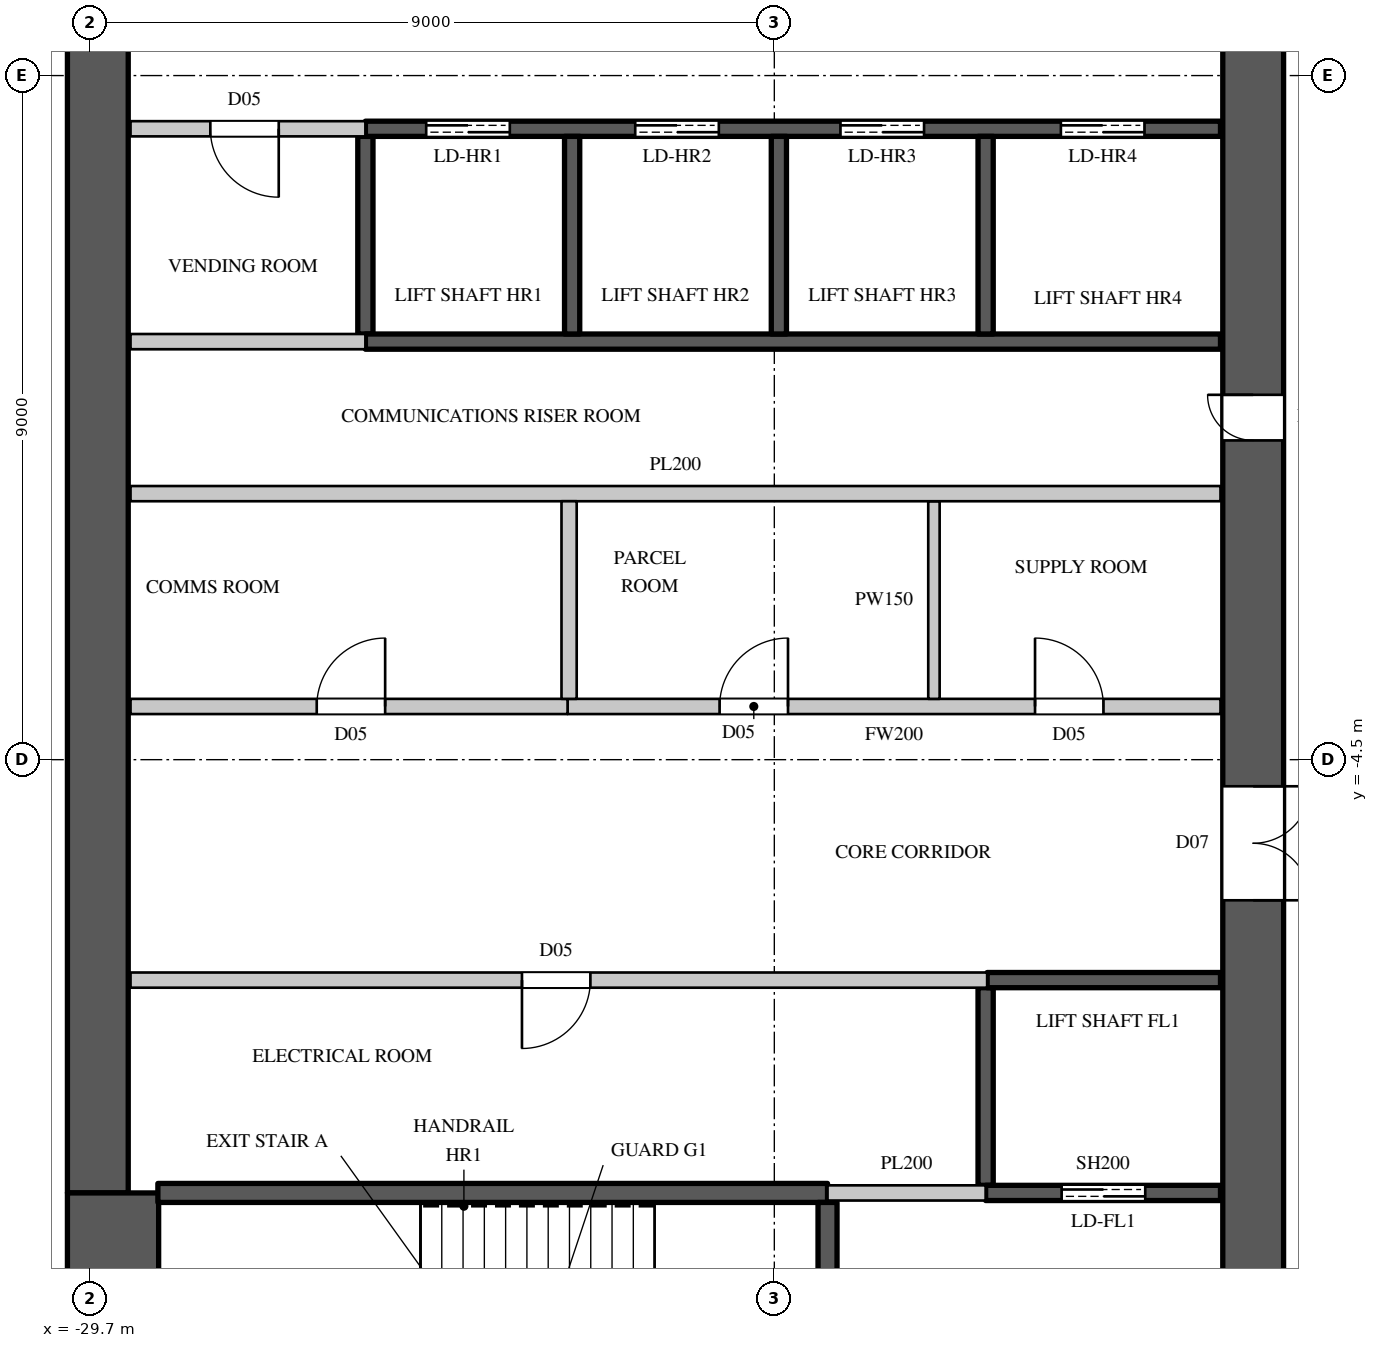
"""IFC4 building model, lengths in metres.
Left out: names, types, materials, properties, quantities, classifications, styles, units other than length and angle.
Written with IfcOpenShell. Run it as: python <this file> out.ifc"""

import sys

from ifc_helpers import new_model, si_unit, direction, frame, frame_2d, origin, place, context, subcontext, project, spatial, rectangle, extrude, element, fill, save


model = new_model("IFC4")
c1 = context("Model", 3, precision=1e-05, world=origin(), true_north=direction((0.0, 1.0)))
c2 = subcontext(c1, "Body", "Model", "MODEL_VIEW")
j1 = project(units=[si_unit("LENGTHUNIT", "METRE"), si_unit("PLANEANGLEUNIT", "RADIAN")], contexts=[c1])
p1 = place(None, origin())
s1 = spatial("IfcSite", under=j1, at=p1, CompositionType="ELEMENT")
p2 = place(p1, origin())
s2 = spatial("IfcBuilding", under=s1, at=p2, CompositionType="ELEMENT")
p3 = place(p2, frame((0.0, 0.0, 197.4)))
s3 = spatial("IfcBuildingStorey", under=s2, at=p3, CompositionType="ELEMENT", Elevation=197.4)
p4 = place(p3, frame((-14.4, -14.8, 0.0), z_axis=(0.0, 0.0, 1.0), x_axis=(0.0, 1.0, 0.0)))
e1 = element("IfcWall", 1, at=p4, inside=s3, PredefinedType="SHEAR", context=c2, shape_type="SweptSolid", body=[
    extrude(rectangle(XDim=29.6, YDim=0.8, at=frame_2d((14.8, 0.0))), origin(), (0.0, 0.0, 1.0), 4.1),
])
p5 = place(p4, frame((1.55, 0.0, 0.0)))
e2 = element("IfcOpeningElement", 2, at=p5, cuts=e1, PredefinedType="OPENING", context=c2, shape_type="SweptSolid", body=[
    extrude(rectangle(XDim=1.5, YDim=2.4, at=frame_2d((0.75, 1.2))), frame((0.0, 0.41, 0.0), z_axis=(0.0, -1.0, 0.0), x_axis=(1.0, 0.0, 0.0)), (0.0, 0.0, 1.0), 0.82),
])
p6 = place(p4, frame((26.55, 0.0, 0.0)))
e3 = element("IfcOpeningElement", 3, at=p6, cuts=e1, PredefinedType="OPENING", context=c2, shape_type="SweptSolid", body=[
    extrude(rectangle(XDim=1.5, YDim=2.4, at=frame_2d((0.75, 1.2))), frame((0.0, 0.41, 0.0), z_axis=(0.0, -1.0, 0.0), x_axis=(1.0, 0.0, 0.0)), (0.0, 0.0, 1.0), 0.82),
])
p7 = place(p4, frame((8.45, 0.0, 0.0)))
e4 = element("IfcOpeningElement", 4, at=p7, cuts=e1, PredefinedType="OPENING", context=c2, shape_type="SweptSolid", body=[
    extrude(rectangle(XDim=1.5, YDim=2.4, at=frame_2d((0.75, 1.2))), frame((0.0, 0.41, 0.0), z_axis=(0.0, -1.0, 0.0), x_axis=(1.0, 0.0, 0.0)), (0.0, 0.0, 1.0), 0.82),
])
p8 = place(p4, frame((19.65, 0.0, 0.0)))
e5 = element("IfcOpeningElement", 5, at=p8, cuts=e1, PredefinedType="OPENING", context=c2, shape_type="SweptSolid", body=[
    extrude(rectangle(XDim=1.5, YDim=2.4, at=frame_2d((0.75, 1.2))), frame((0.0, 0.41, 0.0), z_axis=(0.0, -1.0, 0.0), x_axis=(1.0, 0.0, 0.0)), (0.0, 0.0, 1.0), 0.82),
])
p9 = place(p4, frame((14.5, 0.0, 0.0)))
e6 = element("IfcOpeningElement", 6, at=p9, cuts=e1, PredefinedType="OPENING", context=c2, shape_type="SweptSolid", body=[
    extrude(rectangle(XDim=0.6, YDim=2.0, at=frame_2d((0.3, 1.0))), frame((0.0, 0.41, 0.0), z_axis=(0.0, -1.0, 0.0), x_axis=(1.0, 0.0, 0.0)), (0.0, 0.0, 1.0), 0.82),
])
p10 = place(p3, frame((-29.6, -10.2, 0.0), z_axis=(0.0, 0.0, 1.0), x_axis=(0.0, 1.0, 0.0)))
e7 = element("IfcWall", 7, at=p10, inside=s3, PredefinedType="SHEAR", context=c2, shape_type="SweptSolid", body=[
    extrude(rectangle(XDim=20.4, YDim=0.8, at=frame_2d((10.2, 0.0))), origin(), (0.0, 0.0, 1.0), 4.1),
])
p11 = place(p3, frame((-29.4, -14.8, 0.0), z_axis=(0.0, 0.0, 1.0), x_axis=(0.0, 1.0, 0.0)))
e8 = element("IfcWall", 8, at=p11, inside=s3, PredefinedType="SHEAR", context=c2, shape_type="SweptSolid", body=[
    extrude(rectangle(XDim=4.6, YDim=1.2, at=frame_2d((2.3, 0.0))), origin(), (0.0, 0.0, 1.0), 4.1),
])
p12 = place(p3, frame((-29.17, 3.8, 0.0), z_axis=(0.0, 0.0, 1.0), x_axis=(1.0, 0.0, 0.0)))
e9 = element("IfcWall", 9, at=p12, inside=s3, PredefinedType="PARTITIONING", context=c2, shape_type="SweptSolid", body=[
    extrude(rectangle(XDim=3.09, YDim=0.2, at=frame_2d((1.545, 0.0))), origin(), (0.0, 0.0, 1.0), 3.8),
])
p13 = place(p12, frame((1.05, 0.0, 0.0)))
e10 = element("IfcOpeningElement", 10, at=p13, cuts=e9, PredefinedType="OPENING", context=c2, shape_type="SweptSolid", body=[
    extrude(rectangle(XDim=0.9, YDim=2.2, at=frame_2d((0.45, 1.1))), frame((0.0, 0.11, 0.0), z_axis=(0.0, -1.0, 0.0), x_axis=(1.0, 0.0, 0.0)), (0.0, 0.0, 1.0), 0.22),
])
p14 = place(p3, frame((-23.42, -3.8, 0.0), z_axis=(0.0, 0.0, 1.0), x_axis=(1.0, 0.0, 0.0)))
e11 = element("IfcWall", 11, at=p14, inside=s3, PredefinedType="PARTITIONING", context=c2, shape_type="SweptSolid", body=[
    extrude(rectangle(XDim=8.59, YDim=0.2, at=frame_2d((4.295, 0.0))), origin(), (0.0, 0.0, 1.0), 3.8),
])
p15 = place(p14, frame((2.0, 0.0, 0.0)))
e12 = element("IfcOpeningElement", 12, at=p15, cuts=e11, PredefinedType="OPENING", context=c2, shape_type="SweptSolid", body=[
    extrude(rectangle(XDim=0.9, YDim=2.2, at=frame_2d((0.45, 1.1))), frame((0.0, 0.11, 0.0), z_axis=(0.0, -1.0, 0.0), x_axis=(1.0, 0.0, 0.0)), (0.0, 0.0, 1.0), 0.22),
])
p16 = place(p14, frame((6.15, 0.0, 0.0)))
e13 = element("IfcOpeningElement", 13, at=p16, cuts=e11, PredefinedType="OPENING", context=c2, shape_type="SweptSolid", body=[
    extrude(rectangle(XDim=0.9, YDim=2.2, at=frame_2d((0.45, 1.1))), frame((0.0, 0.11, 0.0), z_axis=(0.0, -1.0, 0.0), x_axis=(1.0, 0.0, 0.0)), (0.0, 0.0, 1.0), 0.22),
])
p17 = place(p3, frame((-18.6, -3.7, 0.0), z_axis=(0.0, 0.0, 1.0), x_axis=(0.0, 1.0, 0.0)))
e14 = element("IfcWall", 14, at=p17, inside=s3, PredefinedType="PARTITIONING", context=c2, shape_type="SweptSolid", body=[
    extrude(rectangle(XDim=2.6, YDim=0.15, at=frame_2d((1.3, 0.0))), origin(), (0.0, 0.0, 1.0), 3.8),
])
p18 = place(p3, frame((-29.17, -7.4, 0.0), z_axis=(0.0, 0.0, 1.0), x_axis=(1.0, 0.0, 0.0)))
e15 = element("IfcWall", 15, at=p18, inside=s3, PredefinedType="PARTITIONING", context=c2, shape_type="SweptSolid", body=[
    extrude(rectangle(XDim=11.27, YDim=0.2, at=frame_2d((5.635, 0.0))), origin(), (0.0, 0.0, 1.0), 3.8),
])
p19 = place(p18, frame((5.15, 0.0, 0.0)))
e16 = element("IfcOpeningElement", 16, at=p19, cuts=e15, PredefinedType="OPENING", context=c2, shape_type="SweptSolid", body=[
    extrude(rectangle(XDim=0.9, YDim=2.2, at=frame_2d((0.45, 1.1))), frame((0.0, 0.11, 0.0), z_axis=(0.0, -1.0, 0.0), x_axis=(1.0, 0.0, 0.0)), (0.0, 0.0, 1.0), 0.22),
])
p20 = place(p3, frame((-29.17, -3.8, 0.0), z_axis=(0.0, 0.0, 1.0), x_axis=(1.0, 0.0, 0.0)))
e17 = element("IfcWall", 17, at=p20, inside=s3, PredefinedType="PARTITIONING", context=c2, shape_type="SweptSolid", body=[
    extrude(rectangle(XDim=5.75, YDim=0.2, at=frame_2d((2.875, 0.0))), origin(), (0.0, 0.0, 1.0), 3.8),
])
p21 = place(p20, frame((2.45, 0.0, 0.0)))
e18 = element("IfcOpeningElement", 18, at=p21, cuts=e17, PredefinedType="OPENING", context=c2, shape_type="SweptSolid", body=[
    extrude(rectangle(XDim=0.9, YDim=2.2, at=frame_2d((0.45, 1.1))), frame((0.0, 0.11, 0.0), z_axis=(0.0, -1.0, 0.0), x_axis=(1.0, 0.0, 0.0)), (0.0, 0.0, 1.0), 0.22),
])
p22 = place(p3, frame((-29.17, -1.0, 0.0), z_axis=(0.0, 0.0, 1.0), x_axis=(1.0, 0.0, 0.0)))
e19 = element("IfcWall", 19, at=p22, inside=s3, PredefinedType="PARTITIONING", context=c2, shape_type="SweptSolid", body=[
    extrude(rectangle(XDim=14.34, YDim=0.2, at=frame_2d((7.17, 0.0))), origin(), (0.0, 0.0, 1.0), 3.8),
])
p23 = place(p3, frame((-29.17, 1.0, 0.0), z_axis=(0.0, 0.0, 1.0), x_axis=(1.0, 0.0, 0.0)))
e20 = element("IfcWall", 20, at=p23, inside=s3, PredefinedType="PARTITIONING", context=c2, shape_type="SweptSolid", body=[
    extrude(rectangle(XDim=3.09, YDim=0.2, at=frame_2d((1.545, 0.0))), origin(), (0.0, 0.0, 1.0), 3.8),
])
p24 = place(p3, frame((-23.4, -3.7, 0.0), z_axis=(0.0, 0.0, 1.0), x_axis=(0.0, 1.0, 0.0)))
e21 = element("IfcWall", 21, at=p24, inside=s3, PredefinedType="PARTITIONING", context=c2, shape_type="SweptSolid", body=[
    extrude(rectangle(XDim=2.6, YDim=0.2, at=frame_2d((1.3, 0.0))), origin(), (0.0, 0.0, 1.0), 3.8),
])
p25 = place(p3, frame((-20.0, -10.2, 0.0), z_axis=(0.0, 0.0, 1.0), x_axis=(1.0, 0.0, 0.0)))
e22 = element("IfcWall", 22, at=p25, inside=s3, PredefinedType="PARTITIONING", context=c2, shape_type="SweptSolid", body=[
    extrude(rectangle(XDim=2.08, YDim=0.2, at=frame_2d((1.04, 0.0))), origin(), (0.0, 0.0, 1.0), 3.8),
])
p26 = place(p3, frame((-26.08, 1.1, 0.0), z_axis=(0.0, 0.0, 1.0), x_axis=(0.0, 1.0, 0.0)))
e23 = element("IfcWall", 23, at=p26, inside=s3, PredefinedType="SHEAR", context=c2, shape_type="SweptSolid", body=[
    extrude(rectangle(XDim=2.6, YDim=0.2, at=frame_2d((1.3, 0.0))), origin(), (0.0, 0.0, 1.0), 3.8),
])
p27 = place(p3, frame((-26.08, 1.0, 0.0), z_axis=(0.0, 0.0, 1.0), x_axis=(1.0, 0.0, 0.0)))
e24 = element("IfcWall", 24, at=p27, inside=s3, PredefinedType="SHEAR", context=c2, shape_type="SweptSolid", body=[
    extrude(rectangle(XDim=11.25, YDim=0.2, at=frame_2d((5.625, 0.0))), origin(), (0.0, 0.0, 1.0), 3.8),
])
p28 = place(p3, frame((-26.08, 3.8, 0.0), z_axis=(0.0, 0.0, 1.0), x_axis=(1.0, 0.0, 0.0)))
e25 = element("IfcWall", 25, at=p28, inside=s3, PredefinedType="SHEAR", context=c2, shape_type="SweptSolid", body=[
    extrude(rectangle(XDim=11.25, YDim=0.2, at=frame_2d((5.625, 0.0))), origin(), (0.0, 0.0, 1.0), 3.8),
])
p29 = place(p28, frame((0.8, 0.0, 0.0)))
e26 = element("IfcOpeningElement", 26, at=p29, cuts=e25, PredefinedType="OPENING", context=c2, shape_type="SweptSolid", body=[
    extrude(rectangle(XDim=1.1, YDim=2.2, at=frame_2d((0.55, 1.1))), frame((0.0, 0.11, 0.0), z_axis=(0.0, -1.0, 0.0), x_axis=(1.0, 0.0, 0.0)), (0.0, 0.0, 1.0), 0.22),
])
p30 = place(p28, frame((3.55, 0.0, 0.0)))
e27 = element("IfcOpeningElement", 27, at=p30, cuts=e25, PredefinedType="OPENING", context=c2, shape_type="SweptSolid", body=[
    extrude(rectangle(XDim=1.1, YDim=2.2, at=frame_2d((0.55, 1.1))), frame((0.0, 0.11, 0.0), z_axis=(0.0, -1.0, 0.0), x_axis=(1.0, 0.0, 0.0)), (0.0, 0.0, 1.0), 0.22),
])
p31 = place(p28, frame((6.25, 0.0, 0.0)))
e28 = element("IfcOpeningElement", 28, at=p31, cuts=e25, PredefinedType="OPENING", context=c2, shape_type="SweptSolid", body=[
    extrude(rectangle(XDim=1.1, YDim=2.2, at=frame_2d((0.55, 1.1))), frame((0.0, 0.11, 0.0), z_axis=(0.0, -1.0, 0.0), x_axis=(1.0, 0.0, 0.0)), (0.0, 0.0, 1.0), 0.22),
])
p32 = place(p28, frame((9.15, 0.0, 0.0)))
e29 = element("IfcOpeningElement", 29, at=p32, cuts=e25, PredefinedType="OPENING", context=c2, shape_type="SweptSolid", body=[
    extrude(rectangle(XDim=1.1, YDim=2.2, at=frame_2d((0.55, 1.1))), frame((0.0, 0.11, 0.0), z_axis=(0.0, -1.0, 0.0), x_axis=(1.0, 0.0, 0.0)), (0.0, 0.0, 1.0), 0.22),
])
for number, where, z_axis, x_axis in (
    (30, (-23.36, 1.1, 0.0), (0.0, 0.0, 1.0), (0.0, 1.0, 0.0)),
    (31, (-20.64, 1.1, 0.0), (0.0, 0.0, 1.0), (0.0, 1.0, 0.0)),
):
    element("IfcWall", number, at=place(p3, frame(where, z_axis=z_axis, x_axis=x_axis)), inside=s3, PredefinedType="SHEAR", context=c2, shape_type="SweptSolid", body=[
        extrude(rectangle(XDim=2.6, YDim=0.2, at=frame_2d((1.3, 0.0))), origin(), (0.0, 0.0, 1.0), 4.1),
    ])
p33 = place(p3, frame((-17.92, -10.1, 0.0), z_axis=(0.0, 0.0, 1.0), x_axis=(0.0, 1.0, 0.0)))
e32 = element("IfcWall", 32, at=p33, inside=s3, PredefinedType="SHEAR", context=c2, shape_type="SweptSolid", body=[
    extrude(rectangle(XDim=2.6, YDim=0.2, at=frame_2d((1.3, 0.0))), origin(), (0.0, 0.0, 1.0), 3.8),
])
p34 = place(p3, frame((-17.92, -10.2, 0.0), z_axis=(0.0, 0.0, 1.0), x_axis=(1.0, 0.0, 0.0)))
e33 = element("IfcWall", 33, at=p34, inside=s3, PredefinedType="SHEAR", context=c2, shape_type="SweptSolid", body=[
    extrude(rectangle(XDim=3.09, YDim=0.2, at=frame_2d((1.545, 0.0))), origin(), (0.0, 0.0, 1.0), 3.8),
])
p35 = place(p34, frame((1.0, 0.0, 0.0)))
e34 = element("IfcOpeningElement", 34, at=p35, cuts=e33, PredefinedType="OPENING", context=c2, shape_type="SweptSolid", body=[
    extrude(rectangle(XDim=1.1, YDim=2.2, at=frame_2d((0.55, 1.1))), frame((0.0, 0.11, 0.0), z_axis=(0.0, -1.0, 0.0), x_axis=(1.0, 0.0, 0.0)), (0.0, 0.0, 1.0), 0.22),
])
p36 = place(p3, frame((-17.9, -7.4, 0.0), z_axis=(0.0, 0.0, 1.0), x_axis=(1.0, 0.0, 0.0)))
e35 = element("IfcWall", 35, at=p36, inside=s3, PredefinedType="SHEAR", context=c2, shape_type="SweptSolid", body=[
    extrude(rectangle(XDim=3.07, YDim=0.2, at=frame_2d((1.535, 0.0))), origin(), (0.0, 0.0, 1.0), 3.8),
])
p37 = place(p3, frame((-17.92, 1.1, 0.0), z_axis=(0.0, 0.0, 1.0), x_axis=(0.0, 1.0, 0.0)))
e36 = element("IfcWall", 36, at=p37, inside=s3, PredefinedType="SHEAR", context=c2, shape_type="SweptSolid", body=[
    extrude(rectangle(XDim=2.6, YDim=0.2, at=frame_2d((1.3, 0.0))), origin(), (0.0, 0.0, 1.0), 4.1),
])
p38 = place(p3, frame((-28.81, -10.2, 0.0), z_axis=(0.0, 0.0, 1.0), x_axis=(1.0, 0.0, 0.0)))
e37 = element("IfcWall", 37, at=p38, inside=s3, PredefinedType="SHEAR", context=c2, shape_type="SweptSolid", body=[
    extrude(rectangle(XDim=8.81, YDim=0.25, at=frame_2d((4.405, 0.0))), origin(), (0.0, 0.0, 1.0), 3.8),
])
p39 = place(p3, frame((-20.0, -14.77, 0.0), z_axis=(0.0, 0.0, 1.0), x_axis=(0.0, 1.0, 0.0)))
e38 = element("IfcWall", 38, at=p39, inside=s3, PredefinedType="SHEAR", context=c2, shape_type="SweptSolid", body=[
    extrude(rectangle(XDim=4.445, YDim=0.25, at=frame_2d((2.223, 0.0))), origin(), (0.0, 0.0, 1.0), 3.8),
])
p40 = place(p39, frame((1.7, 0.0, 0.0)))
e39 = element("IfcOpeningElement", 39, at=p40, cuts=e38, PredefinedType="OPENING", context=c2, shape_type="SweptSolid", body=[
    extrude(rectangle(XDim=1.1, YDim=2.2, at=frame_2d((0.55, 1.1))), frame((0.0, 0.135, 0.0), z_axis=(0.0, -1.0, 0.0), x_axis=(1.0, 0.0, 0.0)), (0.0, 0.0, 1.0), 0.27),
])
p41 = place(p19, origin())
e40 = element("IfcDoor", 40, at=p41, inside=s3, OperationType="SINGLE_SWING_RIGHT", PredefinedType="DOOR", context=c2, shape_type="SweptSolid", body=[
    extrude(rectangle(XDim=0.9, YDim=2.2, at=frame_2d((0.45, 1.1))), frame((0.0, 0.025, 0.0), z_axis=(0.0, -1.0, 0.0), x_axis=(1.0, 0.0, 0.0)), (0.0, 0.0, 1.0), 0.05),
])
fill(e16, e40)
p42 = place(p21, origin())
e41 = element("IfcDoor", 41, at=p42, inside=s3, OperationType="SINGLE_SWING_RIGHT", PredefinedType="DOOR", context=c2, shape_type="SweptSolid", body=[
    extrude(rectangle(XDim=0.9, YDim=2.2, at=frame_2d((0.45, 1.1))), frame((0.0, 0.025, 0.0), z_axis=(0.0, -1.0, 0.0), x_axis=(1.0, 0.0, 0.0)), (0.0, 0.0, 1.0), 0.05),
])
fill(e18, e41)
p43 = place(p15, origin())
e42 = element("IfcDoor", 42, at=p43, inside=s3, OperationType="SINGLE_SWING_RIGHT", PredefinedType="DOOR", context=c2, shape_type="SweptSolid", body=[
    extrude(rectangle(XDim=0.9, YDim=2.2, at=frame_2d((0.45, 1.1))), frame((0.0, 0.025, 0.0), z_axis=(0.0, -1.0, 0.0), x_axis=(1.0, 0.0, 0.0)), (0.0, 0.0, 1.0), 0.05),
])
fill(e12, e42)
p44 = place(p16, origin())
e43 = element("IfcDoor", 43, at=p44, inside=s3, OperationType="SINGLE_SWING_LEFT", PredefinedType="DOOR", context=c2, shape_type="SweptSolid", body=[
    extrude(rectangle(XDim=0.9, YDim=2.2, at=frame_2d((0.45, 1.1))), frame((0.0, 0.025, 0.0), z_axis=(0.0, -1.0, 0.0), x_axis=(1.0, 0.0, 0.0)), (0.0, 0.0, 1.0), 0.05),
])
fill(e13, e43)
p45 = place(p13, origin())
e44 = element("IfcDoor", 44, at=p45, inside=s3, OperationType="SINGLE_SWING_LEFT", PredefinedType="DOOR", context=c2, shape_type="SweptSolid", body=[
    extrude(rectangle(XDim=0.9, YDim=2.2, at=frame_2d((0.45, 1.1))), frame((0.0, 0.025, 0.0), z_axis=(0.0, -1.0, 0.0), x_axis=(1.0, 0.0, 0.0)), (0.0, 0.0, 1.0), 0.05),
])
fill(e10, e44)
p46 = place(p35, origin())
e45 = element("IfcDoor", 45, at=p46, inside=s3, OperationType="DOUBLE_DOOR_SLIDING", PredefinedType="DOOR", context=c2, shape_type="SweptSolid", body=[
    extrude(rectangle(XDim=1.1, YDim=2.2, at=frame_2d((0.55, 1.1))), frame((0.0, 0.025, 0.0), z_axis=(0.0, -1.0, 0.0), x_axis=(1.0, 0.0, 0.0)), (0.0, 0.0, 1.0), 0.05),
])
fill(e34, e45)
p47 = place(p29, origin())
e46 = element("IfcDoor", 46, at=p47, inside=s3, OperationType="DOUBLE_DOOR_SLIDING", PredefinedType="DOOR", context=c2, shape_type="SweptSolid", body=[
    extrude(rectangle(XDim=1.1, YDim=2.2, at=frame_2d((0.55, 1.1))), frame((0.0, 0.025, 0.0), z_axis=(0.0, -1.0, 0.0), x_axis=(1.0, 0.0, 0.0)), (0.0, 0.0, 1.0), 0.05),
])
fill(e26, e46)
p48 = place(p30, origin())
e47 = element("IfcDoor", 47, at=p48, inside=s3, OperationType="DOUBLE_DOOR_SLIDING", PredefinedType="DOOR", context=c2, shape_type="SweptSolid", body=[
    extrude(rectangle(XDim=1.1, YDim=2.2, at=frame_2d((0.55, 1.1))), frame((0.0, 0.025, 0.0), z_axis=(0.0, -1.0, 0.0), x_axis=(1.0, 0.0, 0.0)), (0.0, 0.0, 1.0), 0.05),
])
fill(e27, e47)
p49 = place(p31, origin())
e48 = element("IfcDoor", 48, at=p49, inside=s3, OperationType="DOUBLE_DOOR_SLIDING", PredefinedType="DOOR", context=c2, shape_type="SweptSolid", body=[
    extrude(rectangle(XDim=1.1, YDim=2.2, at=frame_2d((0.55, 1.1))), frame((0.0, 0.025, 0.0), z_axis=(0.0, -1.0, 0.0), x_axis=(1.0, 0.0, 0.0)), (0.0, 0.0, 1.0), 0.05),
])
fill(e28, e48)
p50 = place(p32, origin())
e49 = element("IfcDoor", 49, at=p50, inside=s3, OperationType="DOUBLE_DOOR_SLIDING", PredefinedType="DOOR", context=c2, shape_type="SweptSolid", body=[
    extrude(rectangle(XDim=1.1, YDim=2.2, at=frame_2d((0.55, 1.1))), frame((0.0, 0.025, 0.0), z_axis=(0.0, -1.0, 0.0), x_axis=(1.0, 0.0, 0.0)), (0.0, 0.0, 1.0), 0.05),
])
fill(e29, e49)
p51 = place(p7, origin())
e50 = element("IfcDoor", 50, at=p51, inside=s3, OperationType="DOUBLE_DOOR_SINGLE_SWING", PredefinedType="DOOR", context=c2, shape_type="SweptSolid", body=[
    extrude(rectangle(XDim=1.5, YDim=2.4, at=frame_2d((0.75, 1.2))), frame((0.0, -0.345, 0.0), z_axis=(0.0, -1.0, 0.0), x_axis=(1.0, 0.0, 0.0)), (0.0, 0.0, 1.0), 0.05),
])
fill(e4, e50)
p52 = place(p9, origin())
e51 = element("IfcDoor", 51, at=p52, inside=s3, OperationType="SINGLE_SWING_RIGHT", PredefinedType="DOOR", context=c2, shape_type="SweptSolid", body=[
    extrude(rectangle(XDim=0.6, YDim=2.0, at=frame_2d((0.3, 1.0))), frame((0.0, 0.395, 0.0), z_axis=(0.0, -1.0, 0.0), x_axis=(1.0, 0.0, 0.0)), (0.0, 0.0, 1.0), 0.05),
])
fill(e6, e51)
save(model, sys.argv[1])
